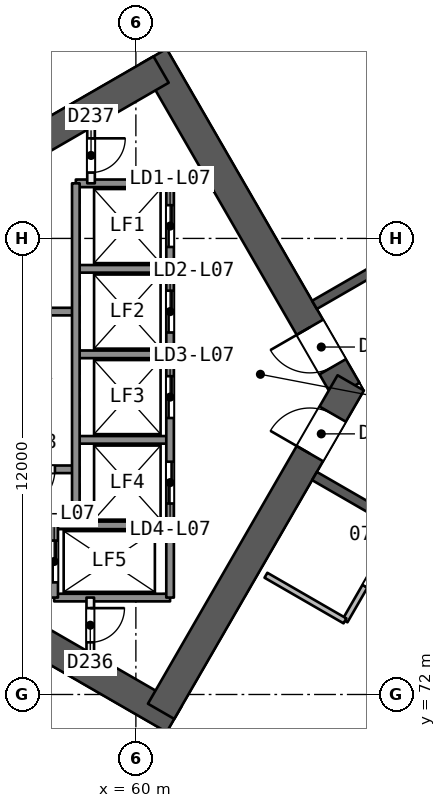
"""IFC4 building model, lengths in metres.
Left out: names, types, materials, properties, quantities, classifications, styles, units other than length and angle.
Written with IfcOpenShell. Run it as: python <this file> out.ifc"""

import sys

from ifc_helpers import new_model, si_unit, direction, frame, frame_2d, origin, place, context, subcontext, project, spatial, rectangle, extrude, element, fill, save


model = new_model("IFC4")
c1 = context("Model", 3, precision=1e-05, world=origin(), true_north=direction((0.0, 1.0)))
c2 = subcontext(c1, "Body", "Model", "MODEL_VIEW")
j1 = project(units=[si_unit("LENGTHUNIT", "METRE"), si_unit("PLANEANGLEUNIT", "RADIAN")], contexts=[c1])
p1 = place(None, origin())
s1 = spatial("IfcSite", under=j1, at=p1, CompositionType="ELEMENT")
p2 = place(p1, origin())
s2 = spatial("IfcBuilding", under=s1, at=p2, CompositionType="ELEMENT")
p3 = place(p2, frame((0.0, 0.0, 37.4)))
s3 = spatial("IfcBuildingStorey", under=s2, at=p3, CompositionType="ELEMENT", Elevation=37.4)
p4 = place(p3, frame((65.538, 80.0, 0.0), z_axis=(0.0, 0.0, 1.0), x_axis=(-0.49999662545, 0.866027352073, 0.0)))
e1 = element("IfcWall", 1, at=p4, inside=s3, PredefinedType="SHEAR", context=c2, shape_type="SweptSolid", body=[
    extrude(rectangle(XDim=10.149, YDim=0.8, at=frame_2d((5.074, 0.0))), origin(), (0.0, 0.0, 1.0), 3.7),
])
p5 = place(p4, frame((0.719, 0.0, 0.0)))
e2 = element("IfcOpeningElement", 2, at=p5, cuts=e1, PredefinedType="OPENING", context=c2, shape_type="SweptSolid", body=[
    extrude(rectangle(XDim=1.2, YDim=2.1, at=frame_2d((0.6, 1.05))), frame((0.0, 0.411, 0.0), z_axis=(0.0, -1.0, 0.0), x_axis=(1.0, 0.0, 0.0)), (0.0, 0.0, 1.0), 0.821),
])
p6 = place(p3, frame((60.664, 88.443, 0.0), z_axis=(0.0, 0.0, 1.0), x_axis=(-0.866029478545, -0.499992942241, 0.0)))
e3 = element("IfcWall", 3, at=p6, inside=s3, PredefinedType="SHEAR", context=c2, shape_type="SweptSolid", body=[
    extrude(rectangle(XDim=13.933, YDim=0.8, at=frame_2d((6.967, 0.0))), origin(), (0.0, 0.0, 1.0), 3.7),
])
p7 = place(p3, frame((48.797, 78.408, 0.0), z_axis=(0.0, 0.0, 1.0), x_axis=(0.866032504327, -0.499987701298, 0.0)))
e4 = element("IfcWall", 4, at=p7, inside=s3, PredefinedType="SHEAR", context=c2, shape_type="SweptSolid", body=[
    extrude(rectangle(XDim=14.102, YDim=0.8, at=frame_2d((7.051, 0.0))), origin(), (0.0, 0.0, 1.0), 3.7),
])
p8 = place(p3, frame((60.664, 71.557, 0.0), z_axis=(0.0, 0.0, 1.0), x_axis=(0.50000409368, 0.866023040284, 0.0)))
e5 = element("IfcWall", 5, at=p8, inside=s3, PredefinedType="SHEAR", context=c2, shape_type="SweptSolid", body=[
    extrude(rectangle(XDim=9.98, YDim=0.8, at=frame_2d((4.99, 0.0))), origin(), (0.0, 0.0, 1.0), 3.7),
])
p9 = place(p8, frame((7.83, 0.0, 0.0)))
e6 = element("IfcOpeningElement", 6, at=p9, cuts=e5, PredefinedType="OPENING", context=c2, shape_type="SweptSolid", body=[
    extrude(rectangle(XDim=1.2, YDim=2.1, at=frame_2d((0.6, 1.05))), frame((0.0, 0.411, 0.0), z_axis=(0.0, -1.0, 0.0), x_axis=(1.0, 0.0, 0.0)), (0.0, 0.0, 1.0), 0.821),
])
p10 = place(p3, frame((78.2, 90.046, 0.0), z_axis=(0.0, 0.0, 1.0), x_axis=(-0.866026492143, -0.499998114903, 0.0)))
e7 = element("IfcWall", 7, at=p10, inside=s3, PredefinedType="SHEAR", context=c2, shape_type="SweptSolid", body=[
    extrude(rectangle(XDim=15.588, YDim=0.25, at=frame_2d((7.794, 0.0))), origin(), (0.0, 0.0, 1.0), 3.2),
])
p11 = place(p10, frame((2.618, 0.0, 0.0)))
e8 = element("IfcOpeningElement", 8, at=p11, cuts=e7, PredefinedType="OPENING", context=c2, shape_type="SweptSolid", body=[
    extrude(rectangle(XDim=1.0, YDim=2.1, at=frame_2d((0.5, 1.05))), frame((0.0, 0.135, 0.0), z_axis=(0.0, -1.0, 0.0), x_axis=(1.0, 0.0, 0.0)), (0.0, 0.0, 1.0), 0.271),
])
p12 = place(p10, frame((9.218, 0.0, 0.0)))
e9 = element("IfcOpeningElement", 9, at=p12, cuts=e7, PredefinedType="OPENING", context=c2, shape_type="SweptSolid", body=[
    extrude(rectangle(XDim=1.0, YDim=2.1, at=frame_2d((0.5, 1.05))), frame((0.0, 0.135, 0.0), z_axis=(0.0, -1.0, 0.0), x_axis=(1.0, 0.0, 0.0)), (0.0, 0.0, 1.0), 0.271),
])
p13 = place(p10, frame((12.594, 0.0, 0.0)))
e10 = element("IfcOpeningElement", 10, at=p13, cuts=e7, PredefinedType="OPENING", context=c2, shape_type="SweptSolid", body=[
    extrude(rectangle(XDim=1.0, YDim=2.1, at=frame_2d((0.5, 1.05))), frame((0.0, 0.135, 0.0), z_axis=(0.0, -1.0, 0.0), x_axis=(1.0, 0.0, 0.0)), (0.0, 0.0, 1.0), 0.271),
])
p14 = place(p3, frame((64.7, 77.748, 0.0), z_axis=(0.0, 0.0, 1.0), x_axis=(0.866026492143, -0.499998114903, 0.0)))
e11 = element("IfcWall", 11, at=p14, inside=s3, PredefinedType="SHEAR", context=c2, shape_type="SweptSolid", body=[
    extrude(rectangle(XDim=15.588, YDim=0.25, at=frame_2d((7.794, 0.0))), origin(), (0.0, 0.0, 1.0), 3.2),
])
p15 = place(p14, frame((3.138, 0.0, 0.0)))
e12 = element("IfcOpeningElement", 12, at=p15, cuts=e11, PredefinedType="OPENING", context=c2, shape_type="SweptSolid", body=[
    extrude(rectangle(XDim=1.0, YDim=2.1, at=frame_2d((0.5, 1.05))), frame((0.0, 0.135, 0.0), z_axis=(0.0, -1.0, 0.0), x_axis=(1.0, 0.0, 0.0)), (0.0, 0.0, 1.0), 0.271),
])
p16 = place(p14, frame((9.006, 0.0, 0.0)))
e13 = element("IfcOpeningElement", 13, at=p16, cuts=e11, PredefinedType="OPENING", context=c2, shape_type="SweptSolid", body=[
    extrude(rectangle(XDim=1.1, YDim=2.1, at=frame_2d((0.55, 1.05))), frame((0.0, 0.135, 0.0), z_axis=(0.0, -1.0, 0.0), x_axis=(1.0, 0.0, 0.0)), (0.0, 0.0, 1.0), 0.271),
])
p17 = place(p14, frame((11.762, 0.0, 0.0)))
e14 = element("IfcOpeningElement", 14, at=p17, cuts=e11, PredefinedType="OPENING", context=c2, shape_type="SweptSolid", body=[
    extrude(rectangle(XDim=1.0, YDim=2.1, at=frame_2d((0.5, 1.05))), frame((0.0, 0.135, 0.0), z_axis=(0.0, -1.0, 0.0), x_axis=(1.0, 0.0, 0.0)), (0.0, 0.0, 1.0), 0.271),
])
for number, where, z_axis, x_axis in (
    (15, (65.749, 99.141, 0.0), (0.0, 0.0, 1.0), (0.5, -0.866, 0.0)),
    (16, (61.969, 96.958, 0.0), (0.0, 0.0, 1.0), (0.5, -0.866, 0.0)),
):
    element("IfcWall", number, at=place(p3, frame(where, z_axis=z_axis, x_axis=x_axis)), inside=s3, PredefinedType="PARTITIONING", context=c2, shape_type="SweptSolid", body=[
        extrude(rectangle(XDim=14.102, YDim=0.2, at=frame_2d((7.051, 0.0))), origin(), (0.0, 0.0, 1.0), 3.2),
    ])
p18 = place(p3, frame((66.952, 76.448, 0.0), z_axis=(0.0, 0.0, 1.0), x_axis=(-0.499987231761, -0.866032775405, 0.0)))
e17 = element("IfcWall", 17, at=p18, inside=s3, PredefinedType="PARTITIONING", context=c2, shape_type="SweptSolid", body=[
    extrude(rectangle(XDim=2.9, YDim=0.15, at=frame_2d((1.45, 0.0))), origin(), (0.0, 0.0, 1.0), 3.2),
])
p19 = place(p18, frame((1.05, 0.0, 0.0)))
e18 = element("IfcOpeningElement", 18, at=p19, cuts=e17, PredefinedType="OPENING", context=c2, shape_type="SweptSolid", body=[
    extrude(rectangle(XDim=0.8, YDim=2.1, at=frame_2d((0.4, 1.05))), frame((0.0, 0.085, 0.0), z_axis=(0.0, -1.0, 0.0), x_axis=(1.0, 0.0, 0.0)), (0.0, 0.0, 1.0), 0.171),
])
p20 = place(p3, frame((65.502, 73.937, 0.0), z_axis=(0.0, 0.0, 1.0), x_axis=(-0.865994240961, 0.500053971709, 0.0)))
e19 = element("IfcWall", 19, at=p20, inside=s3, PredefinedType="PARTITIONING", context=c2, shape_type="SweptSolid", body=[
    extrude(rectangle(XDim=2.401, YDim=0.15, at=frame_2d((1.201, 0.0))), origin(), (0.0, 0.0, 1.0), 3.2),
])
p21 = place(p3, frame((61.699, 63.198, 0.0), z_axis=(0.0, 0.0, 1.0), x_axis=(0.499999115929, 0.866025914202, 0.0)))
e20 = element("IfcWall", 20, at=p21, inside=s3, PredefinedType="PARTITIONING", context=c2, shape_type="SweptSolid", body=[
    extrude(rectangle(XDim=11.102, YDim=0.2, at=frame_2d((5.551, 0.0))), origin(), (0.0, 0.0, 1.0), 3.2),
])
p22 = place(p3, frame((37.74, 83.141, 0.0), z_axis=(0.0, 0.0, 1.0), x_axis=(0.866026524777, 0.499998058379, 0.0)))
e21 = element("IfcWall", 21, at=p22, inside=s3, PredefinedType="SOLIDWALL", context=c2, shape_type="SweptSolid", body=[
    extrude(rectangle(XDim=61.395, YDim=0.3, at=frame_2d((30.698, 0.0))), origin(), (0.0, 0.0, 1.0), 3.2),
])
p23 = place(p22, frame((34.174, 0.0, 0.0)))
e22 = element("IfcOpeningElement", 22, at=p23, cuts=e21, PredefinedType="OPENING", context=c2, shape_type="SweptSolid", body=[
    extrude(rectangle(XDim=2.4, YDim=2.4, at=frame_2d((1.2, 1.2))), frame((0.0, 0.161, 0.0), z_axis=(0.0, -1.0, 0.0), x_axis=(1.0, 0.0, 0.0)), (0.0, 0.0, 1.0), 0.321),
])
p24 = place(p22, frame((47.603, 0.0, 0.0)))
e23 = element("IfcOpeningElement", 23, at=p24, cuts=e21, PredefinedType="OPENING", context=c2, shape_type="SweptSolid", body=[
    extrude(rectangle(XDim=2.4, YDim=2.4, at=frame_2d((1.2, 1.2))), frame((0.0, 0.161, 0.0), z_axis=(0.0, -1.0, 0.0), x_axis=(1.0, 0.0, 0.0)), (0.0, 0.0, 1.0), 0.321),
])
p25 = place(p22, frame((24.198, 0.0, 0.0)))
e24 = element("IfcOpeningElement", 24, at=p25, cuts=e21, PredefinedType="OPENING", context=c2, shape_type="SweptSolid", body=[
    extrude(rectangle(XDim=2.4, YDim=2.4, at=frame_2d((1.2, 1.2))), frame((0.0, 0.161, 0.0), z_axis=(0.0, -1.0, 0.0), x_axis=(1.0, 0.0, 0.0)), (0.0, 0.0, 1.0), 0.321),
])
p26 = place(p22, frame((11.394, 0.0, 0.0)))
e25 = element("IfcOpeningElement", 25, at=p26, cuts=e21, PredefinedType="OPENING", context=c2, shape_type="SweptSolid", body=[
    extrude(rectangle(XDim=2.4, YDim=2.4, at=frame_2d((1.2, 1.2))), frame((0.0, 0.161, 0.0), z_axis=(0.0, -1.0, 0.0), x_axis=(1.0, 0.0, 0.0)), (0.0, 0.0, 1.0), 0.321),
])
p27 = place(p22, frame((28.874, 0.0, 0.0)))
e26 = element("IfcOpeningElement", 26, at=p27, cuts=e21, PredefinedType="OPENING", context=c2, shape_type="SweptSolid", body=[
    extrude(rectangle(XDim=2.4, YDim=2.4, at=frame_2d((1.2, 1.2))), frame((0.0, 0.161, 0.0), z_axis=(0.0, -1.0, 0.0), x_axis=(1.0, 0.0, 0.0)), (0.0, 0.0, 1.0), 0.321),
])
p28 = place(p3, frame((90.91, 46.161, 0.0), z_axis=(0.0, 0.0, 1.0), x_axis=(-0.866026524777, 0.499998058379, 0.0)))
e27 = element("IfcWall", 27, at=p28, inside=s3, PredefinedType="SOLIDWALL", context=c2, shape_type="SweptSolid", body=[
    extrude(rectangle(XDim=61.395, YDim=0.3, at=frame_2d((30.698, 0.0))), origin(), (0.0, 0.0, 1.0), 3.2),
])
p29 = place(p28, frame((29.186, 0.0, 0.0)))
e28 = element("IfcOpeningElement", 28, at=p29, cuts=e27, PredefinedType="OPENING", context=c2, shape_type="SweptSolid", body=[
    extrude(rectangle(XDim=2.4, YDim=2.4, at=frame_2d((1.2, 1.2))), frame((0.0, 0.161, 0.0), z_axis=(0.0, -1.0, 0.0), x_axis=(1.0, 0.0, 0.0)), (0.0, 0.0, 1.0), 0.321),
])
p30 = place(p28, frame((46.448, 0.0, 0.0)))
e29 = element("IfcOpeningElement", 29, at=p30, cuts=e27, PredefinedType="OPENING", context=c2, shape_type="SweptSolid", body=[
    extrude(rectangle(XDim=2.4, YDim=2.4, at=frame_2d((1.2, 1.2))), frame((0.0, 0.161, 0.0), z_axis=(0.0, -1.0, 0.0), x_axis=(1.0, 0.0, 0.0)), (0.0, 0.0, 1.0), 0.321),
])
p31 = place(p28, frame((12.235, 0.0, 0.0)))
e30 = element("IfcOpeningElement", 30, at=p31, cuts=e27, PredefinedType="OPENING", context=c2, shape_type="SweptSolid", body=[
    extrude(rectangle(XDim=2.4, YDim=2.4, at=frame_2d((1.2, 1.2))), frame((0.0, 0.161, 0.0), z_axis=(0.0, -1.0, 0.0), x_axis=(1.0, 0.0, 0.0)), (0.0, 0.0, 1.0), 0.321),
])
for number, where, z_axis, x_axis in (
    (31, (60.9, 85.45, 0.0), (0.0, 0.0, 1.0), (-1.0, 0.0, 0.0)),
    (32, (60.9, 83.2, 0.0), (0.0, 0.0, 1.0), (-1.0, 0.0, 0.0)),
):
    element("IfcWall", number, at=place(p3, frame(where, z_axis=z_axis, x_axis=x_axis)), inside=s3, PredefinedType="SOLIDWALL", context=c2, shape_type="SweptSolid", body=[
        extrude(rectangle(XDim=2.48, YDim=0.2, at=frame_2d((1.24, 0.0))), origin(), (0.0, 0.0, 1.0), 3.2),
    ])
p32 = place(p3, frame((58.42, 82.075, 0.0), z_axis=(0.0, 0.0, 1.0), x_axis=(-1.0, 0.0, 0.0)))
e33 = element("IfcWall", 33, at=p32, inside=s3, PredefinedType="SOLIDWALL", context=c2, shape_type="SweptSolid", body=[
    extrude(rectangle(XDim=7.7, YDim=0.2, at=frame_2d((3.85, 0.0))), origin(), (0.0, 0.0, 1.0), 3.2),
])
for number, where, z_axis, x_axis in (
    (34, (60.9, 80.95, 0.0), (0.0, 0.0, 1.0), (-1.0, 0.0, 0.0)),
    (35, (60.9, 78.7, 0.0), (0.0, 0.0, 1.0), (-1.0, 0.0, 0.0)),
):
    element("IfcWall", number, at=place(p3, frame(where, z_axis=z_axis, x_axis=x_axis)), inside=s3, PredefinedType="SOLIDWALL", context=c2, shape_type="SweptSolid", body=[
        extrude(rectangle(XDim=2.48, YDim=0.2, at=frame_2d((1.24, 0.0))), origin(), (0.0, 0.0, 1.0), 3.2),
    ])
p33 = place(p3, frame((58.42, 77.925, 0.0), z_axis=(0.0, 0.0, 1.0), x_axis=(-1.0, 0.0, 0.0)))
e36 = element("IfcWall", 36, at=p33, inside=s3, PredefinedType="SOLIDWALL", context=c2, shape_type="SweptSolid", body=[
    extrude(rectangle(XDim=7.7, YDim=0.2, at=frame_2d((3.85, 0.0))), origin(), (0.0, 0.0, 1.0), 3.2),
])
p34 = place(p33, frame((0.55, 0.0, 0.0)))
e37 = element("IfcOpeningElement", 37, at=p34, cuts=e36, PredefinedType="OPENING", context=c2, shape_type="SweptSolid", body=[
    extrude(rectangle(XDim=1.1, YDim=2.1, at=frame_2d((0.55, 1.05))), frame((0.0, 0.11, 0.0), z_axis=(0.0, -1.0, 0.0), x_axis=(1.0, 0.0, 0.0)), (0.0, 0.0, 1.0), 0.221),
])
for number, where, z_axis, x_axis in (
    (38, (60.9, 76.45, 0.0), (0.0, 0.0, 1.0), (-1.0, 0.0, 0.0)),
    (39, (60.9, 74.55, 0.0), (0.0, 0.0, 1.0), (-1.0, 0.0, 0.0)),
):
    element("IfcWall", number, at=place(p3, frame(where, z_axis=z_axis, x_axis=x_axis)), inside=s3, PredefinedType="SOLIDWALL", context=c2, shape_type="SweptSolid", body=[
        extrude(rectangle(XDim=3.05, YDim=0.2, at=frame_2d((1.525, 0.0))), origin(), (0.0, 0.0, 1.0), 3.2),
    ])
p35 = place(p3, frame((60.9, 85.45, 0.0), z_axis=(0.0, 0.0, 1.0), x_axis=(0.0, -1.0, 0.0)))
e40 = element("IfcWall", 40, at=p35, inside=s3, PredefinedType="SOLIDWALL", context=c2, shape_type="SweptSolid", body=[
    extrude(rectangle(XDim=10.9, YDim=0.2, at=frame_2d((5.45, 0.0))), origin(), (0.0, 0.0, 1.0), 3.2),
])
p36 = place(p35, frame((0.575, 0.0, 0.0)))
e41 = element("IfcOpeningElement", 41, at=p36, cuts=e40, PredefinedType="OPENING", context=c2, shape_type="SweptSolid", body=[
    extrude(rectangle(XDim=1.1, YDim=2.1, at=frame_2d((0.55, 1.05))), frame((0.0, 0.11, 0.0), z_axis=(0.0, -1.0, 0.0), x_axis=(1.0, 0.0, 0.0)), (0.0, 0.0, 1.0), 0.221),
])
p37 = place(p35, frame((2.825, 0.0, 0.0)))
e42 = element("IfcOpeningElement", 42, at=p37, cuts=e40, PredefinedType="OPENING", context=c2, shape_type="SweptSolid", body=[
    extrude(rectangle(XDim=1.1, YDim=2.1, at=frame_2d((0.55, 1.05))), frame((0.0, 0.11, 0.0), z_axis=(0.0, -1.0, 0.0), x_axis=(1.0, 0.0, 0.0)), (0.0, 0.0, 1.0), 0.221),
])
p38 = place(p35, frame((5.075, 0.0, 0.0)))
e43 = element("IfcOpeningElement", 43, at=p38, cuts=e40, PredefinedType="OPENING", context=c2, shape_type="SweptSolid", body=[
    extrude(rectangle(XDim=1.1, YDim=2.1, at=frame_2d((0.55, 1.05))), frame((0.0, 0.11, 0.0), z_axis=(0.0, -1.0, 0.0), x_axis=(1.0, 0.0, 0.0)), (0.0, 0.0, 1.0), 0.221),
])
p39 = place(p35, frame((7.325, 0.0, 0.0)))
e44 = element("IfcOpeningElement", 44, at=p39, cuts=e40, PredefinedType="OPENING", context=c2, shape_type="SweptSolid", body=[
    extrude(rectangle(XDim=1.1, YDim=2.1, at=frame_2d((0.55, 1.05))), frame((0.0, 0.11, 0.0), z_axis=(0.0, -1.0, 0.0), x_axis=(1.0, 0.0, 0.0)), (0.0, 0.0, 1.0), 0.221),
])
p40 = place(p3, frame((58.82, 86.917, 0.0), z_axis=(0.0, 0.0, 1.0), x_axis=(0.0, -1.0, 0.0)))
e45 = element("IfcWall", 45, at=p40, inside=s3, PredefinedType="PARTITIONING", context=c2, shape_type="SweptSolid", body=[
    extrude(rectangle(XDim=1.467, YDim=0.2, at=frame_2d((0.733, 0.0))), origin(), (0.0, 0.0, 1.0), 3.2),
])
p41 = place(p40, frame((0.283, 0.0, 0.0)))
e46 = element("IfcOpeningElement", 46, at=p41, cuts=e45, PredefinedType="OPENING", context=c2, shape_type="SweptSolid", body=[
    extrude(rectangle(XDim=0.9, YDim=2.1, at=frame_2d((0.45, 1.05))), frame((0.0, 0.11, 0.0), z_axis=(0.0, -1.0, 0.0), x_axis=(1.0, 0.0, 0.0)), (0.0, 0.0, 1.0), 0.221),
])
p42 = place(p3, frame((58.8, 74.55, 0.0), z_axis=(0.0, 0.0, 1.0), x_axis=(0.0, -1.0, 0.0)))
e47 = element("IfcWall", 47, at=p42, inside=s3, PredefinedType="PARTITIONING", context=c2, shape_type="SweptSolid", body=[
    extrude(rectangle(XDim=1.455, YDim=0.2, at=frame_2d((0.728, 0.0))), origin(), (0.0, 0.0, 1.0), 3.2),
])
p43 = place(p42, frame((0.278, 0.0, 0.0)))
e48 = element("IfcOpeningElement", 48, at=p43, cuts=e47, PredefinedType="OPENING", context=c2, shape_type="SweptSolid", body=[
    extrude(rectangle(XDim=0.9, YDim=2.1, at=frame_2d((0.45, 1.05))), frame((0.0, 0.11, 0.0), z_axis=(0.0, -1.0, 0.0), x_axis=(1.0, 0.0, 0.0)), (0.0, 0.0, 1.0), 0.221),
])
p44 = place(p3, frame((58.42, 85.45, 0.0), z_axis=(0.0, 0.0, 1.0), x_axis=(0.0, -1.0, 0.0)))
e49 = element("IfcWall", 49, at=p44, inside=s3, PredefinedType="SOLIDWALL", context=c2, shape_type="SweptSolid", body=[
    extrude(rectangle(XDim=9.0, YDim=0.2, at=frame_2d((4.5, 0.0))), origin(), (0.0, 0.0, 1.0), 3.2),
])
p45 = place(p3, frame((57.85, 76.45, 0.0), z_axis=(0.0, 0.0, 1.0), x_axis=(0.0, -1.0, 0.0)))
e50 = element("IfcWall", 50, at=p45, inside=s3, PredefinedType="SOLIDWALL", context=c2, shape_type="SweptSolid", body=[
    extrude(rectangle(XDim=1.9, YDim=0.2, at=frame_2d((0.95, 0.0))), origin(), (0.0, 0.0, 1.0), 3.2),
])
p46 = place(p45, frame((0.4, 0.0, 0.0)))
e51 = element("IfcOpeningElement", 51, at=p46, cuts=e50, PredefinedType="OPENING", context=c2, shape_type="SweptSolid", body=[
    extrude(rectangle(XDim=1.1, YDim=2.1, at=frame_2d((0.55, 1.05))), frame((0.0, 0.11, 0.0), z_axis=(0.0, -1.0, 0.0), x_axis=(1.0, 0.0, 0.0)), (0.0, 0.0, 1.0), 0.221),
])
p47 = place(p19, origin())
e52 = element("IfcDoor", 52, at=p47, inside=s3, OperationType="SINGLE_SWING_RIGHT", PredefinedType="NOTDEFINED", context=c2, shape_type="SweptSolid", body=[
    extrude(rectangle(XDim=0.8, YDim=2.1, at=frame_2d((0.4, 1.05))), frame((0.0, 0.025, 0.0), z_axis=(0.0, -1.0, 0.0), x_axis=(1.0, 0.0, 0.0)), (0.0, 0.0, 1.0), 0.05),
])
fill(e18, e52)
p48 = place(p5, origin())
e53 = element("IfcDoor", 53, at=p48, inside=s3, OperationType="SINGLE_SWING_RIGHT", PredefinedType="NOTDEFINED", context=c2, shape_type="SweptSolid", body=[
    extrude(rectangle(XDim=1.2, YDim=2.1, at=frame_2d((0.6, 1.05))), frame((0.0, 0.025, 0.0), z_axis=(0.0, -1.0, 0.0), x_axis=(1.0, 0.0, 0.0)), (0.0, 0.0, 1.0), 0.05),
])
fill(e2, e53)
p49 = place(p9, origin())
e54 = element("IfcDoor", 54, at=p49, inside=s3, OperationType="SINGLE_SWING_LEFT", PredefinedType="NOTDEFINED", context=c2, shape_type="SweptSolid", body=[
    extrude(rectangle(XDim=1.2, YDim=2.1, at=frame_2d((0.6, 1.05))), frame((0.0, 0.025, 0.0), z_axis=(0.0, -1.0, 0.0), x_axis=(1.0, 0.0, 0.0)), (0.0, 0.0, 1.0), 0.05),
])
fill(e6, e54)
p50 = place(p36, origin())
e55 = element("IfcDoor", 55, at=p50, inside=s3, OperationType="SLIDING_TO_RIGHT", PredefinedType="NOTDEFINED", context=c2, shape_type="SweptSolid", body=[
    extrude(rectangle(XDim=1.1, YDim=2.1, at=frame_2d((0.55, 1.05))), frame((0.0, 0.025, 0.0), z_axis=(0.0, -1.0, 0.0), x_axis=(1.0, 0.0, 0.0)), (0.0, 0.0, 1.0), 0.05),
])
fill(e41, e55)
p51 = place(p37, origin())
e56 = element("IfcDoor", 56, at=p51, inside=s3, OperationType="SLIDING_TO_LEFT", PredefinedType="NOTDEFINED", context=c2, shape_type="SweptSolid", body=[
    extrude(rectangle(XDim=1.1, YDim=2.1, at=frame_2d((0.55, 1.05))), frame((0.0, 0.025, 0.0), z_axis=(0.0, -1.0, 0.0), x_axis=(1.0, 0.0, 0.0)), (0.0, 0.0, 1.0), 0.05),
])
fill(e42, e56)
p52 = place(p38, origin())
e57 = element("IfcDoor", 57, at=p52, inside=s3, OperationType="SLIDING_TO_RIGHT", PredefinedType="NOTDEFINED", context=c2, shape_type="SweptSolid", body=[
    extrude(rectangle(XDim=1.1, YDim=2.1, at=frame_2d((0.55, 1.05))), frame((0.0, 0.025, 0.0), z_axis=(0.0, -1.0, 0.0), x_axis=(1.0, 0.0, 0.0)), (0.0, 0.0, 1.0), 0.05),
])
fill(e43, e57)
p53 = place(p39, origin())
e58 = element("IfcDoor", 58, at=p53, inside=s3, OperationType="SLIDING_TO_LEFT", PredefinedType="NOTDEFINED", context=c2, shape_type="SweptSolid", body=[
    extrude(rectangle(XDim=1.1, YDim=2.1, at=frame_2d((0.55, 1.05))), frame((0.0, 0.025, 0.0), z_axis=(0.0, -1.0, 0.0), x_axis=(1.0, 0.0, 0.0)), (0.0, 0.0, 1.0), 0.05),
])
fill(e44, e58)
p54 = place(p46, origin())
e59 = element("IfcDoor", 59, at=p54, inside=s3, OperationType="SLIDING_TO_RIGHT", PredefinedType="NOTDEFINED", context=c2, shape_type="SweptSolid", body=[
    extrude(rectangle(XDim=1.1, YDim=2.1, at=frame_2d((0.55, 1.05))), frame((0.0, 0.025, 0.0), z_axis=(0.0, -1.0, 0.0), x_axis=(1.0, 0.0, 0.0)), (0.0, 0.0, 1.0), 0.05),
])
fill(e51, e59)
p55 = place(p43, origin())
e60 = element("IfcDoor", 60, at=p55, inside=s3, OperationType="SINGLE_SWING_LEFT", PredefinedType="NOTDEFINED", context=c2, shape_type="SweptSolid", body=[
    extrude(rectangle(XDim=0.9, YDim=2.1, at=frame_2d((0.45, 1.05))), frame((0.0, 0.025, 0.0), z_axis=(0.0, -1.0, 0.0), x_axis=(1.0, 0.0, 0.0)), (0.0, 0.0, 1.0), 0.05),
])
fill(e48, e60)
p56 = place(p41, origin())
e61 = element("IfcDoor", 61, at=p56, inside=s3, OperationType="SINGLE_SWING_LEFT", PredefinedType="NOTDEFINED", context=c2, shape_type="SweptSolid", body=[
    extrude(rectangle(XDim=0.9, YDim=2.1, at=frame_2d((0.45, 1.05))), frame((0.0, 0.025, 0.0), z_axis=(0.0, -1.0, 0.0), x_axis=(1.0, 0.0, 0.0)), (0.0, 0.0, 1.0), 0.05),
])
fill(e46, e61)
p57 = place(p34, origin())
e62 = element("IfcDoor", 62, at=p57, inside=s3, OperationType="SINGLE_SWING_RIGHT", PredefinedType="NOTDEFINED", context=c2, shape_type="SweptSolid", body=[
    extrude(rectangle(XDim=1.1, YDim=2.1, at=frame_2d((0.55, 1.05))), frame((0.0, 0.025, 0.0), z_axis=(0.0, -1.0, 0.0), x_axis=(1.0, 0.0, 0.0)), (0.0, 0.0, 1.0), 0.05),
])
fill(e37, e62)
save(model, sys.argv[1])
